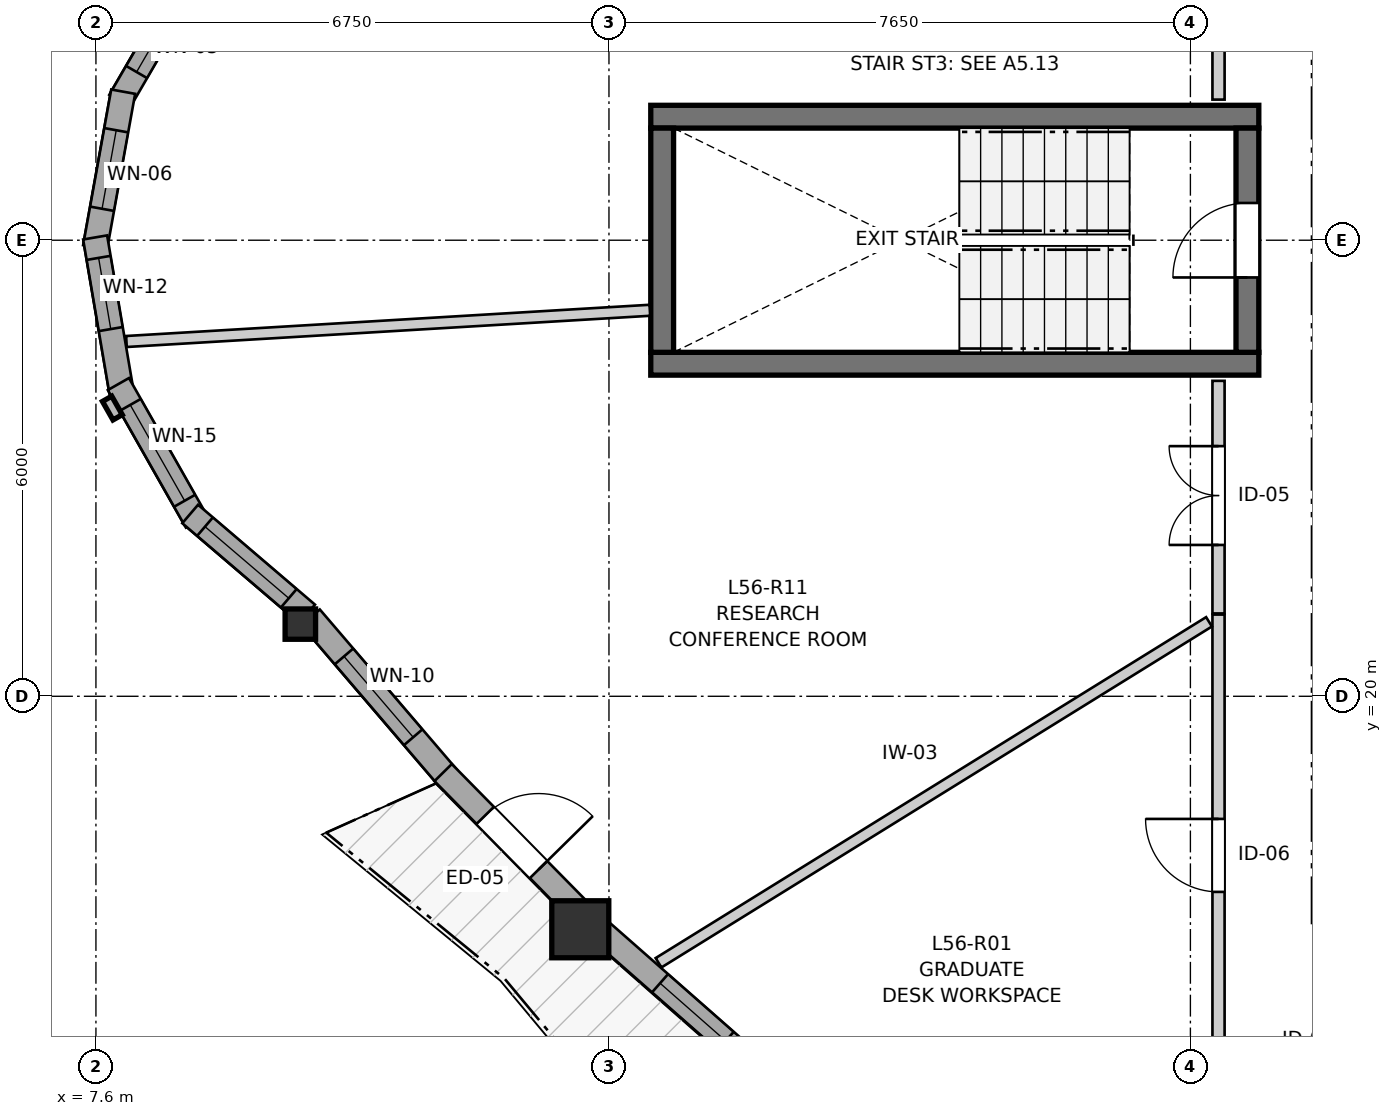
"""IFC4 building model, lengths in metres.
Left out: names, types, materials, properties, quantities, classifications, styles, units other than length and angle.
Written with IfcOpenShell. Run it as: python <this file> out.ifc"""

import sys

from ifc_helpers import new_model, si_unit, direction, frame, frame_2d, origin, origin_2d, place, context, subcontext, project, spatial, rectangle, i_section, extrude, source, transform, mapped, element, fill, save


model = new_model("IFC4")
c1 = context("Model", 3, precision=1e-05, world=origin(), true_north=direction((0.0, 1.0)))
c2 = subcontext(c1, "Body", "Model", "MODEL_VIEW")
j1 = project(units=[si_unit("LENGTHUNIT", "METRE"), si_unit("PLANEANGLEUNIT", "RADIAN")], contexts=[c1])
p1 = place(None, origin())
s1 = spatial("IfcSite", under=j1, at=p1, CompositionType="ELEMENT")
p2 = place(p1, origin())
s2 = spatial("IfcBuilding", under=s1, at=p2, CompositionType="ELEMENT")
p3 = place(p2, frame((0.0, 0.0, 187.4)))
s3 = spatial("IfcBuildingStorey", under=s2, at=p3, CompositionType="ELEMENT", Elevation=187.4)
for number, where, z_axis, x_axis in (
    (1, (14.9, 24.375, 0.0), (0.0, 0.0, 1.0), (1.0, 0.0, 0.0)),
    (2, (22.9, 27.625, 0.0), (0.0, 0.0, 1.0), (-1.0, 0.0, 0.0)),
):
    element("IfcWall", number, at=place(p3, frame(where, z_axis=z_axis, x_axis=x_axis)), inside=s3, PredefinedType="SHEAR", context=c2, shape_type="SweptSolid", body=[
        extrude(rectangle(XDim=8.0, YDim=0.3, at=frame_2d((4.0, 0.0))), origin(), (0.0, 0.0, 1.0), 2.9),
    ])
p4 = place(p3, frame((15.05, 27.475, 0.0), z_axis=(0.0, 0.0, 1.0), x_axis=(0.0, -1.0, 0.0)))
e3 = element("IfcWall", 3, at=p4, inside=s3, PredefinedType="SHEAR", context=c2, shape_type="SweptSolid", body=[
    extrude(rectangle(XDim=2.95, YDim=0.3, at=frame_2d((1.475, 0.0))), origin(), (0.0, 0.0, 1.0), 2.9),
])
p5 = place(p3, frame((22.75, 24.525, 0.0), z_axis=(0.0, 0.0, 1.0), x_axis=(0.0, 1.0, 0.0)))
e4 = element("IfcWall", 4, at=p5, inside=s3, PredefinedType="SHEAR", context=c2, shape_type="SweptSolid", body=[
    extrude(rectangle(XDim=2.95, YDim=0.3, at=frame_2d((1.475, 0.0))), origin(), (0.0, 0.0, 1.0), 2.9),
])
p6 = place(p5, frame((0.985, 0.0, 0.0)))
e5 = element("IfcOpeningElement", 5, at=p6, cuts=e4, PredefinedType="OPENING", context=c2, shape_type="SweptSolid", body=[
    extrude(rectangle(XDim=0.98, YDim=2.15, at=frame_2d((0.49, 1.075))), frame((0.0, 0.16, 0.0), z_axis=(0.0, -1.0, 0.0), x_axis=(1.0, 0.0, 0.0)), (0.0, 0.0, 1.0), 0.32),
])
m1 = source(origin(), c2, "Body", "SweptSolid", [
    extrude(i_section(OverallWidth=0.401, OverallDepth=0.399, WebThickness=0.023, FlangeThickness=0.036, FilletRadius=0.015, at=origin_2d()), origin(), (0.0, 0.0, 1.0), 2.9),
])
p7 = place(p3, frame((10.289, 20.95, 0.0), z_axis=(0.0, 0.0, 1.0), x_axis=(1.0, 0.0, 0.0)))
e6 = element("IfcColumn", 6, at=p7, inside=s3, PredefinedType="PILASTER", context=c2, shape_type="MappedRepresentation", body=[
    mapped(m1, transform((0.0, 0.0, 0.0), x_axis=(1.0, 0.0, 0.0), y_axis=(0.0, 1.0, 0.0), z_axis=(0.0, 0.0, 1.0), scale=1.0)),
])
m2 = source(origin(), c2, "Body", "SweptSolid", [
    extrude(rectangle(XDim=0.75, YDim=0.75, at=origin_2d()), origin(), (0.0, 0.0, 1.0), 2.9),
])
p8 = place(p3, frame((13.973, 16.935, 0.0), z_axis=(0.0, 0.0, 1.0), x_axis=(1.0, 0.0, 0.0)))
e7 = element("IfcColumn", 7, at=p8, inside=s3, PredefinedType="COLUMN", context=c2, shape_type="MappedRepresentation", body=[
    mapped(m2, transform((0.0, 0.0, 0.0), x_axis=(1.0, 0.0, 0.0), y_axis=(0.0, 1.0, 0.0), z_axis=(0.0, 0.0, 1.0), scale=1.0)),
])
p9 = place(p3, frame((8.958, 29.632, 0.0), z_axis=(0.0, 0.0, 1.0), x_axis=(-0.502053430046, -0.864836605018, 0.0)))
e8 = element("IfcWall", 8, at=p9, inside=s3, PredefinedType="SOLIDWALL", context=c2, shape_type="SweptSolid", body=[
    extrude(rectangle(XDim=2.081, YDim=0.32, at=frame_2d((1.041, 0.0))), origin(), (0.0, 0.0, 1.0), 2.48),
])
p10 = place(p9, frame((0.44, 0.0, 0.82)))
e9 = element("IfcOpeningElement", 9, at=p10, cuts=e8, PredefinedType="OPENING", context=c2, shape_type="SweptSolid", body=[
    extrude(rectangle(XDim=1.2, YDim=1.45, at=frame_2d((0.6, 0.725))), frame((0.0, 0.17, 0.0), z_axis=(0.0, -1.0, 0.0), x_axis=(1.0, 0.0, 0.0)), (0.0, 0.0, 1.0), 0.34),
])
p11 = place(p3, frame((7.958, 27.954, 0.0), z_axis=(0.0, 0.0, 1.0), x_axis=(-0.177625721103, -0.984098116654, 0.0)))
e10 = element("IfcWall", 10, at=p11, inside=s3, PredefinedType="SOLIDWALL", context=c2, shape_type="SweptSolid", body=[
    extrude(rectangle(XDim=2.081, YDim=0.32, at=frame_2d((1.041, 0.0))), origin(), (0.0, 0.0, 1.0), 2.48),
])
p12 = place(p11, frame((0.515, 0.0, 0.82)))
e11 = element("IfcOpeningElement", 11, at=p12, cuts=e10, PredefinedType="OPENING", context=c2, shape_type="SweptSolid", body=[
    extrude(rectangle(XDim=1.05, YDim=1.45, at=frame_2d((0.525, 0.725))), frame((0.0, 0.17, 0.0), z_axis=(0.0, -1.0, 0.0), x_axis=(1.0, 0.0, 0.0)), (0.0, 0.0, 1.0), 0.34),
])
p13 = place(p3, frame((7.59, 26.037, 0.0), z_axis=(0.0, 0.0, 1.0), x_axis=(0.167993405511, -0.985788119073, 0.0)))
e12 = element("IfcWall", 12, at=p13, inside=s3, PredefinedType="SOLIDWALL", context=c2, shape_type="SweptSolid", body=[
    extrude(rectangle(XDim=2.081, YDim=0.32, at=frame_2d((1.041, 0.0))), origin(), (0.0, 0.0, 1.0), 2.48),
])
p14 = place(p13, frame((0.273, 0.0, 0.82)))
e13 = element("IfcOpeningElement", 13, at=p14, cuts=e12, PredefinedType="OPENING", context=c2, shape_type="SweptSolid", body=[
    extrude(rectangle(XDim=0.95, YDim=1.35, at=frame_2d((0.475, 0.675))), frame((0.0, 0.17, 0.0), z_axis=(0.0, -1.0, 0.0), x_axis=(1.0, 0.0, 0.0)), (0.0, 0.0, 1.0), 0.34),
])
p15 = place(p3, frame((7.896, 24.108, 0.0), z_axis=(0.0, 0.0, 1.0), x_axis=(0.493660675866, -0.869654607936, 0.0)))
e14 = element("IfcWall", 14, at=p15, inside=s3, PredefinedType="SOLIDWALL", context=c2, shape_type="SweptSolid", body=[
    extrude(rectangle(XDim=2.081, YDim=0.32, at=frame_2d((1.041, 0.0))), origin(), (0.0, 0.0, 1.0), 2.48),
])
p16 = place(p15, frame((0.315, 0.0, 0.82)))
e15 = element("IfcOpeningElement", 15, at=p16, cuts=e14, PredefinedType="OPENING", context=c2, shape_type="SweptSolid", body=[
    extrude(rectangle(XDim=1.45, YDim=1.25, at=frame_2d((0.725, 0.625))), frame((0.0, 0.17, 0.0), z_axis=(0.0, -1.0, 0.0), x_axis=(1.0, 0.0, 0.0)), (0.0, 0.0, 1.0), 0.34),
])
p17 = place(p3, frame((8.84, 22.398, 0.0), z_axis=(0.0, 0.0, 1.0), x_axis=(0.760328975209, -0.649538181678, 0.0)))
e16 = element("IfcWall", 16, at=p17, inside=s3, PredefinedType="SOLIDWALL", context=c2, shape_type="SweptSolid", body=[
    extrude(rectangle(XDim=2.023, YDim=0.32, at=frame_2d((1.011, 0.0))), origin(), (0.0, 0.0, 1.0), 2.48),
])
p18 = place(p17, frame((0.257, 0.0, 0.82)))
e17 = element("IfcOpeningElement", 17, at=p18, cuts=e16, PredefinedType="OPENING", context=c2, shape_type="SweptSolid", body=[
    extrude(rectangle(XDim=1.45, YDim=1.25, at=frame_2d((0.725, 0.625))), frame((0.0, 0.17, 0.0), z_axis=(0.0, -1.0, 0.0), x_axis=(1.0, 0.0, 0.0)), (0.0, 0.0, 1.0), 0.34),
])
p19 = place(p3, frame((10.424, 21.038, 0.0), z_axis=(0.0, 0.0, 1.0), x_axis=(0.650261869135, -0.759710143114, 0.0)))
e18 = element("IfcWall", 18, at=p19, inside=s3, PredefinedType="SOLIDWALL", context=c2, shape_type="SweptSolid", body=[
    extrude(rectangle(XDim=2.773, YDim=0.32, at=frame_2d((1.386, 0.0))), origin(), (0.0, 0.0, 1.0), 2.48),
])
p20 = place(p19, frame((0.677, 0.0, 0.82)))
e19 = element("IfcOpeningElement", 19, at=p20, cuts=e18, PredefinedType="OPENING", context=c2, shape_type="SweptSolid", body=[
    extrude(rectangle(XDim=1.4, YDim=1.35, at=frame_2d((0.7, 0.675))), frame((0.0, 0.17, 0.0), z_axis=(0.0, -1.0, 0.0), x_axis=(1.0, 0.0, 0.0)), (0.0, 0.0, 1.0), 0.34),
])
p21 = place(p3, frame((12.168, 18.996, 0.0), z_axis=(0.0, 0.0, 1.0), x_axis=(0.701479569818, -0.712689562943, 0.0)))
e20 = element("IfcWall", 20, at=p21, inside=s3, PredefinedType="SOLIDWALL", context=c2, shape_type="SweptSolid", body=[
    extrude(rectangle(XDim=2.57, YDim=0.32, at=frame_2d((1.285, 0.0))), origin(), (0.0, 0.0, 1.0), 2.48),
])
p22 = place(p21, frame((0.79, 0.0, 0.0)))
e21 = element("IfcOpeningElement", 21, at=p22, cuts=e20, PredefinedType="OPENING", context=c2, shape_type="SweptSolid", body=[
    extrude(rectangle(XDim=1.0, YDim=2.1, at=frame_2d((0.5, 1.05))), frame((0.0, 0.17, 0.0), z_axis=(0.0, -1.0, 0.0), x_axis=(1.0, 0.0, 0.0)), (0.0, 0.0, 1.0), 0.34),
])
p23 = place(p3, frame((14.202, 16.946, 0.0), z_axis=(0.0, 0.0, 1.0), x_axis=(0.751119873672, -0.660165839297, 0.0)))
e22 = element("IfcWall", 22, at=p23, inside=s3, PredefinedType="SOLIDWALL", context=c2, shape_type="SweptSolid", body=[
    extrude(rectangle(XDim=2.526, YDim=0.32, at=frame_2d((1.263, 0.0))), origin(), (0.0, 0.0, 1.0), 2.48),
])
p24 = place(p23, frame((1.092, 0.0, 0.82)))
e23 = element("IfcOpeningElement", 23, at=p24, cuts=e22, PredefinedType="OPENING", context=c2, shape_type="SweptSolid", body=[
    extrude(rectangle(XDim=1.15, YDim=1.2, at=frame_2d((0.575, 0.6))), frame((0.0, 0.17, 0.0), z_axis=(0.0, -1.0, 0.0), x_axis=(1.0, 0.0, 0.0)), (0.0, 0.0, 1.0), 0.34),
])
p25 = place(p3, frame((22.37, 27.85, 0.0), z_axis=(0.0, 0.0, 1.0), x_axis=(0.0, 1.0, 0.0)))
e24 = element("IfcWall", 24, at=p25, inside=s3, PredefinedType="PARTITIONING", context=c2, shape_type="SweptSolid", body=[
    extrude(rectangle(XDim=6.6, YDim=0.16, at=frame_2d((3.3, 0.0))), origin(), (0.0, 0.0, 1.0), 2.9),
])
p26 = place(p25, frame((2.981, 0.0, 0.0)))
e25 = element("IfcOpeningElement", 25, at=p26, cuts=e24, PredefinedType="OPENING", context=c2, shape_type="SweptSolid", body=[
    extrude(rectangle(XDim=1.3, YDim=2.1, at=frame_2d((0.65, 1.05))), frame((0.0, 0.09, 0.0), z_axis=(0.0, -1.0, 0.0), x_axis=(1.0, 0.0, 0.0)), (0.0, 0.0, 1.0), 0.18),
])
p27 = place(p3, frame((22.37, 14.73, 0.0), z_axis=(0.0, 0.0, 1.0), x_axis=(0.0, 1.0, 0.0)))
e26 = element("IfcWall", 26, at=p27, inside=s3, PredefinedType="PARTITIONING", context=c2, shape_type="SweptSolid", body=[
    extrude(rectangle(XDim=6.345, YDim=0.16, at=frame_2d((3.172, 0.0))), origin(), (0.0, 0.0, 1.0), 2.9),
])
p28 = place(p27, frame((2.697, 0.0, 0.0)))
e27 = element("IfcOpeningElement", 27, at=p28, cuts=e26, PredefinedType="OPENING", context=c2, shape_type="SweptSolid", body=[
    extrude(rectangle(XDim=0.96, YDim=2.1, at=frame_2d((0.48, 1.05))), frame((0.0, 0.09, 0.0), z_axis=(0.0, -1.0, 0.0), x_axis=(1.0, 0.0, 0.0)), (0.0, 0.0, 1.0), 0.18),
])
p29 = place(p3, frame((22.37, 21.09, 0.0), z_axis=(0.0, 0.0, 1.0), x_axis=(0.0, 1.0, 0.0)))
e28 = element("IfcWall", 28, at=p29, inside=s3, PredefinedType="PARTITIONING", context=c2, shape_type="SweptSolid", body=[
    extrude(rectangle(XDim=3.06, YDim=0.16, at=frame_2d((1.53, 0.0))), origin(), (0.0, 0.0, 1.0), 2.9),
])
p30 = place(p29, frame((0.901, 0.0, 0.0)))
e29 = element("IfcOpeningElement", 29, at=p30, cuts=e28, PredefinedType="OPENING", context=c2, shape_type="SweptSolid", body=[
    extrude(rectangle(XDim=1.3, YDim=2.1, at=frame_2d((0.65, 1.05))), frame((0.0, 0.09, 0.0), z_axis=(0.0, -1.0, 0.0), x_axis=(1.0, 0.0, 0.0)), (0.0, 0.0, 1.0), 0.18),
])
p31 = place(p3, frame((15.002, 16.494, 0.0), z_axis=(0.0, 0.0, 1.0), x_axis=(0.850179022177, 0.5264937134, 0.0)))
e30 = element("IfcWall", 30, at=p31, inside=s3, PredefinedType="PARTITIONING", context=c2, shape_type="SweptSolid", body=[
    extrude(rectangle(XDim=8.519, YDim=0.145, at=frame_2d((4.26, 0.0))), origin(), (0.0, 0.0, 1.0), 2.9),
])
p32 = place(p3, frame((8.001, 24.667, 0.0), z_axis=(0.0, 0.0, 1.0), x_axis=(0.998224720456, 0.059560116444, 0.0)))
e31 = element("IfcWall", 31, at=p32, inside=s3, PredefinedType="PARTITIONING", context=c2, shape_type="SweptSolid", body=[
    extrude(rectangle(XDim=6.899, YDim=0.145, at=frame_2d((3.449, 0.0))), origin(), (0.0, 0.0, 1.0), 2.9),
])
m3 = source(origin(), c2, "Body", "SweptSolid", [
    extrude(rectangle(XDim=1.2, YDim=1.45, at=frame_2d((0.6, 0.725))), frame((0.0, 0.03, 0.0), z_axis=(0.0, -1.0, 0.0), x_axis=(1.0, 0.0, 0.0)), (0.0, 0.0, 1.0), 0.06),
])
p33 = place(p10, origin())
e32 = element("IfcWindow", 32, at=p33, inside=s3, PartitioningType="SINGLE_PANEL", PredefinedType="WINDOW", context=c2, shape_type="MappedRepresentation", body=[
    mapped(m3, transform((0.0, 0.0, 0.0), x_axis=(1.0, 0.0, 0.0), y_axis=(0.0, 1.0, 0.0), z_axis=(0.0, 0.0, 1.0), scale=1.0)),
])
fill(e9, e32)
m4 = source(origin(), c2, "Body", "SweptSolid", [
    extrude(rectangle(XDim=1.05, YDim=1.45, at=frame_2d((0.525, 0.725))), frame((0.0, 0.03, 0.0), z_axis=(0.0, -1.0, 0.0), x_axis=(1.0, 0.0, 0.0)), (0.0, 0.0, 1.0), 0.06),
])
p34 = place(p12, origin())
e33 = element("IfcWindow", 33, at=p34, inside=s3, PartitioningType="SINGLE_PANEL", PredefinedType="WINDOW", context=c2, shape_type="MappedRepresentation", body=[
    mapped(m4, transform((0.0, 0.0, 0.0), x_axis=(1.0, 0.0, 0.0), y_axis=(0.0, 1.0, 0.0), z_axis=(0.0, 0.0, 1.0), scale=1.0)),
])
fill(e11, e33)
m5 = source(origin(), c2, "Body", "SweptSolid", [
    extrude(rectangle(XDim=0.95, YDim=1.35, at=frame_2d((0.475, 0.675))), frame((0.0, 0.03, 0.0), z_axis=(0.0, -1.0, 0.0), x_axis=(1.0, 0.0, 0.0)), (0.0, 0.0, 1.0), 0.06),
])
p35 = place(p14, origin())
e34 = element("IfcWindow", 34, at=p35, inside=s3, PartitioningType="SINGLE_PANEL", PredefinedType="WINDOW", context=c2, shape_type="MappedRepresentation", body=[
    mapped(m5, transform((0.0, 0.0, 0.0), x_axis=(1.0, 0.0, 0.0), y_axis=(0.0, 1.0, 0.0), z_axis=(0.0, 0.0, 1.0), scale=1.0)),
])
fill(e13, e34)
m6 = source(origin(), c2, "Body", "SweptSolid", [
    extrude(rectangle(XDim=1.45, YDim=1.25, at=frame_2d((0.725, 0.625))), frame((0.0, 0.03, 0.0), z_axis=(0.0, -1.0, 0.0), x_axis=(1.0, 0.0, 0.0)), (0.0, 0.0, 1.0), 0.06),
])
p36 = place(p16, origin())
e35 = element("IfcWindow", 35, at=p36, inside=s3, PartitioningType="SINGLE_PANEL", PredefinedType="WINDOW", context=c2, shape_type="MappedRepresentation", body=[
    mapped(m6, transform((0.0, 0.0, 0.0), x_axis=(1.0, 0.0, 0.0), y_axis=(0.0, 1.0, 0.0), z_axis=(0.0, 0.0, 1.0), scale=1.0)),
])
fill(e15, e35)
p37 = place(p18, origin())
e36 = element("IfcWindow", 36, at=p37, inside=s3, PartitioningType="SINGLE_PANEL", PredefinedType="WINDOW", context=c2, shape_type="MappedRepresentation", body=[
    mapped(m6, transform((0.0, 0.0, 0.0), x_axis=(1.0, 0.0, 0.0), y_axis=(0.0, 1.0, 0.0), z_axis=(0.0, 0.0, 1.0), scale=1.0)),
])
fill(e17, e36)
m7 = source(origin(), c2, "Body", "SweptSolid", [
    extrude(rectangle(XDim=1.4, YDim=1.35, at=frame_2d((0.7, 0.675))), frame((0.0, 0.03, 0.0), z_axis=(0.0, -1.0, 0.0), x_axis=(1.0, 0.0, 0.0)), (0.0, 0.0, 1.0), 0.06),
])
p38 = place(p20, origin())
e37 = element("IfcWindow", 37, at=p38, inside=s3, PartitioningType="SINGLE_PANEL", PredefinedType="WINDOW", context=c2, shape_type="MappedRepresentation", body=[
    mapped(m7, transform((0.0, 0.0, 0.0), x_axis=(1.0, 0.0, 0.0), y_axis=(0.0, 1.0, 0.0), z_axis=(0.0, 0.0, 1.0), scale=1.0)),
])
fill(e19, e37)
m8 = source(origin(), c2, "Body", "SweptSolid", [
    extrude(rectangle(XDim=1.0, YDim=2.1, at=frame_2d((0.5, 1.05))), frame((0.0, 0.025, 0.0), z_axis=(0.0, -1.0, 0.0), x_axis=(1.0, 0.0, 0.0)), (0.0, 0.0, 1.0), 0.05),
])
p39 = place(p22, origin())
e38 = element("IfcDoor", 38, at=p39, inside=s3, OperationType="SINGLE_SWING_RIGHT", PredefinedType="DOOR", context=c2, shape_type="MappedRepresentation", body=[
    mapped(m8, transform((0.0, 0.0, 0.0), x_axis=(1.0, 0.0, 0.0), y_axis=(0.0, 1.0, 0.0), z_axis=(0.0, 0.0, 1.0), scale=1.0)),
])
fill(e21, e38)
m9 = source(origin(), c2, "Body", "SweptSolid", [
    extrude(rectangle(XDim=1.15, YDim=1.2, at=frame_2d((0.575, 0.6))), frame((0.0, 0.03, 0.0), z_axis=(0.0, -1.0, 0.0), x_axis=(1.0, 0.0, 0.0)), (0.0, 0.0, 1.0), 0.06),
])
p40 = place(p24, origin())
e39 = element("IfcWindow", 39, at=p40, inside=s3, PartitioningType="SINGLE_PANEL", PredefinedType="WINDOW", context=c2, shape_type="MappedRepresentation", body=[
    mapped(m9, transform((0.0, 0.0, 0.0), x_axis=(1.0, 0.0, 0.0), y_axis=(0.0, 1.0, 0.0), z_axis=(0.0, 0.0, 1.0), scale=1.0)),
])
fill(e23, e39)
m10 = source(origin(), c2, "Body", "SweptSolid", [
    extrude(rectangle(XDim=0.98, YDim=2.15, at=frame_2d((0.49, 1.075))), frame((0.0, 0.025, 0.0), z_axis=(0.0, -1.0, 0.0), x_axis=(1.0, 0.0, 0.0)), (0.0, 0.0, 1.0), 0.05),
])
p41 = place(p6, origin())
e40 = element("IfcDoor", 40, at=p41, inside=s3, OperationType="SINGLE_SWING_LEFT", PredefinedType="DOOR", context=c2, shape_type="MappedRepresentation", body=[
    mapped(m10, transform((0.0, 0.0, 0.0), x_axis=(1.0, 0.0, 0.0), y_axis=(0.0, 1.0, 0.0), z_axis=(0.0, 0.0, 1.0), scale=1.0)),
])
fill(e5, e40)
m11 = source(origin(), c2, "Body", "SweptSolid", [
    extrude(rectangle(XDim=0.96, YDim=2.1, at=frame_2d((0.48, 1.05))), frame((0.0, 0.025, 0.0), z_axis=(0.0, -1.0, 0.0), x_axis=(1.0, 0.0, 0.0)), (0.0, 0.0, 1.0), 0.05),
])
p42 = place(p28, origin())
e41 = element("IfcDoor", 41, at=p42, inside=s3, OperationType="SINGLE_SWING_RIGHT", PredefinedType="DOOR", context=c2, shape_type="MappedRepresentation", body=[
    mapped(m11, transform((0.0, 0.0, 0.0), x_axis=(1.0, 0.0, 0.0), y_axis=(0.0, 1.0, 0.0), z_axis=(0.0, 0.0, 1.0), scale=1.0)),
])
fill(e27, e41)
m12 = source(origin(), c2, "Body", "SweptSolid", [
    extrude(rectangle(XDim=1.3, YDim=2.1, at=frame_2d((0.65, 1.05))), frame((0.0, 0.025, 0.0), z_axis=(0.0, -1.0, 0.0), x_axis=(1.0, 0.0, 0.0)), (0.0, 0.0, 1.0), 0.05),
])
p43 = place(p30, origin())
e42 = element("IfcDoor", 42, at=p43, inside=s3, OperationType="DOUBLE_DOOR_SINGLE_SWING", PredefinedType="DOOR", context=c2, shape_type="MappedRepresentation", body=[
    mapped(m12, transform((0.0, 0.0, 0.0), x_axis=(1.0, 0.0, 0.0), y_axis=(0.0, 1.0, 0.0), z_axis=(0.0, 0.0, 1.0), scale=1.0)),
])
fill(e29, e42)
save(model, sys.argv[1])
